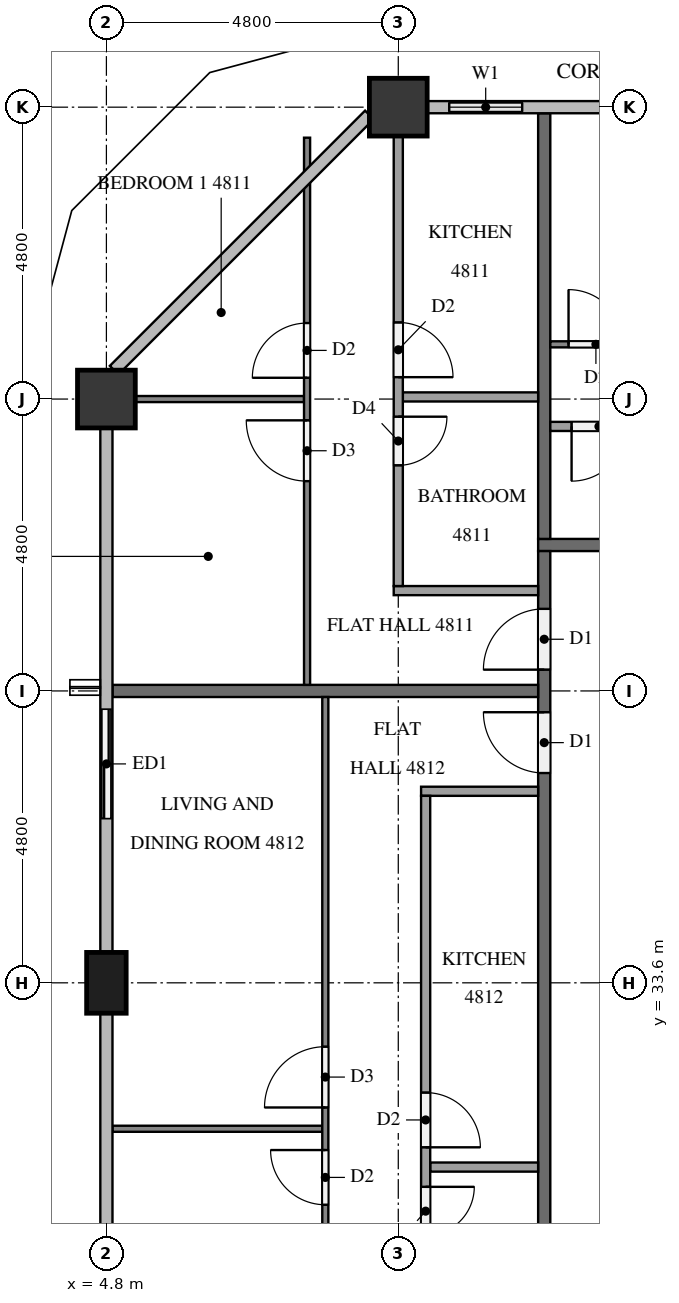
"""IFC4 building model, lengths in metres.
Left out: names, types, materials, properties, quantities, classifications, styles, units other than length and angle.
Written with IfcOpenShell. Run it as: python <this file> out.ifc"""

import sys

from ifc_helpers import new_model, si_unit, direction, frame, frame_2d, origin, origin_2d, place, context, subcontext, project, spatial, rectangle, extrude, element, fill, save


model = new_model("IFC4")
c1 = context("Model", 3, precision=1e-05, world=origin(), true_north=direction((0.0, 1.0)))
c2 = subcontext(c1, "Body", "Model", "MODEL_VIEW")
j1 = project(units=[si_unit("LENGTHUNIT", "METRE"), si_unit("PLANEANGLEUNIT", "RADIAN")], contexts=[c1])
p1 = place(None, origin())
s1 = spatial("IfcSite", under=j1, at=p1, CompositionType="ELEMENT")
p2 = place(p1, origin())
s2 = spatial("IfcBuilding", under=s1, at=p2, CompositionType="ELEMENT")
p3 = place(p2, frame((0.0, 0.0, 185.9)))
s3 = spatial("IfcBuildingStorey", under=s2, at=p3, CompositionType="ELEMENT", Elevation=185.9)
for number, where, z_axis, x_axis in (
    (1, (9.6, 48.0, 0.0), (0.0, 0.0, 1.0), (1.0, 0.0, 0.0)),
    (2, (4.8, 43.2, 0.0), (0.0, 0.0, 1.0), (1.0, 0.0, 0.0)),
):
    element("IfcColumn", number, at=place(p3, frame(where, z_axis=z_axis, x_axis=x_axis)), inside=s3, PredefinedType="COLUMN", context=c2, shape_type="SweptSolid", body=[
        extrude(rectangle(XDim=0.95, YDim=0.95, at=origin_2d()), origin(), (0.0, 0.0, 1.0), 3.2),
    ])
p4 = place(p3, frame((4.8, 33.6, 0.0), z_axis=(0.0, 0.0, 1.0), x_axis=(0.0, 1.0, 0.0)))
e3 = element("IfcColumn", 3, at=p4, inside=s3, PredefinedType="COLUMN", context=c2, shape_type="SweptSolid", body=[
    extrude(rectangle(XDim=1.0, YDim=0.65, at=origin_2d()), origin(), (0.0, 0.0, 1.0), 3.2),
])
p5 = place(p3, frame((12.0, 48.0, 0.0), z_axis=(0.0, 0.0, 1.0), x_axis=(-1.0, 0.0, 0.0)))
e4 = element("IfcWall", 4, at=p5, inside=s3, PredefinedType="SOLIDWALL", context=c2, shape_type="SweptSolid", body=[
    extrude(rectangle(XDim=1.925, YDim=0.15, at=frame_2d((0.962, 0.0))), origin(), (0.0, 0.0, 1.0), 3.2),
])
p6 = place(p5, frame((0.363, 0.0, 0.9)))
e5 = element("IfcOpeningElement", 5, at=p6, cuts=e4, PredefinedType="OPENING", context=c2, shape_type="SweptSolid", body=[
    extrude(rectangle(XDim=1.2, YDim=1.4, at=frame_2d((0.6, 0.7))), frame((0.0, 0.085, 0.0), z_axis=(0.0, -1.0, 0.0), x_axis=(1.0, 0.0, 0.0)), (0.0, 0.0, 1.0), 0.17),
])
p7 = place(p3, frame((4.8, 38.4, 0.0), z_axis=(0.0, 0.0, 1.0), x_axis=(0.0, -1.0, 0.0)))
e6 = element("IfcWall", 6, at=p7, inside=s3, PredefinedType="SOLIDWALL", context=c2, shape_type="SweptSolid", body=[
    extrude(rectangle(XDim=2.4, YDim=0.15, at=frame_2d((1.2, 0.0))), origin(), (0.0, 0.0, 1.0), 3.2),
])
p8 = place(p7, frame((0.3, 0.0, 0.0)))
e7 = element("IfcOpeningElement", 7, at=p8, cuts=e6, PredefinedType="OPENING", context=c2, shape_type="SweptSolid", body=[
    extrude(rectangle(XDim=1.8, YDim=2.4, at=frame_2d((0.9, 1.2))), frame((0.0, 0.085, 0.0), z_axis=(0.0, -1.0, 0.0), x_axis=(1.0, 0.0, 0.0)), (0.0, 0.0, 1.0), 0.17),
])
p9 = place(p3, frame((11.9, 40.8, 0.0), z_axis=(0.0, 0.0, 1.0), x_axis=(1.0, 0.0, 0.0)))
e8 = element("IfcWall", 8, at=p9, inside=s3, PredefinedType="PARTITIONING", context=c2, shape_type="SweptSolid", body=[
    extrude(rectangle(XDim=38.6, YDim=0.2, at=frame_2d((19.3, 0.0))), origin(), (0.0, 0.0, 1.0), 3.2),
])
p10 = place(p9, frame((37.15, 0.0, 0.0)))
e9 = element("IfcOpeningElement", 9, at=p10, cuts=e8, PredefinedType="OPENING", context=c2, shape_type="SweptSolid", body=[
    extrude(rectangle(XDim=1.0, YDim=2.1, at=frame_2d((0.5, 1.05))), frame((0.0, 0.11, 0.0), z_axis=(0.0, -1.0, 0.0), x_axis=(1.0, 0.0, 0.0)), (0.0, 0.0, 1.0), 0.22),
])
p11 = place(p9, frame((20.35, 0.0, 0.0)))
e10 = element("IfcOpeningElement", 10, at=p11, cuts=e8, PredefinedType="OPENING", context=c2, shape_type="SweptSolid", body=[
    extrude(rectangle(XDim=1.0, YDim=2.1, at=frame_2d((0.5, 1.05))), frame((0.0, 0.11, 0.0), z_axis=(0.0, -1.0, 0.0), x_axis=(1.0, 0.0, 0.0)), (0.0, 0.0, 1.0), 0.22),
])
p12 = place(p9, frame((13.15, 0.0, 0.0)))
e11 = element("IfcOpeningElement", 11, at=p12, cuts=e8, PredefinedType="OPENING", context=c2, shape_type="SweptSolid", body=[
    extrude(rectangle(XDim=1.0, YDim=2.1, at=frame_2d((0.5, 1.05))), frame((0.0, 0.11, 0.0), z_axis=(0.0, -1.0, 0.0), x_axis=(1.0, 0.0, 0.0)), (0.0, 0.0, 1.0), 0.22),
])
p13 = place(p3, frame((12.0, 12.1, 0.0), z_axis=(0.0, 0.0, 1.0), x_axis=(0.0, 1.0, 0.0)))
e12 = element("IfcWall", 12, at=p13, inside=s3, PredefinedType="PARTITIONING", context=c2, shape_type="SweptSolid", body=[
    extrude(rectangle(XDim=28.6, YDim=0.2, at=frame_2d((14.3, 0.0))), origin(), (0.0, 0.0, 1.0), 3.2),
])
p14 = place(p13, frame((26.65, 0.0, 0.0)))
e13 = element("IfcOpeningElement", 13, at=p14, cuts=e12, PredefinedType="OPENING", context=c2, shape_type="SweptSolid", body=[
    extrude(rectangle(XDim=1.0, YDim=2.1, at=frame_2d((0.5, 1.05))), frame((0.0, 0.11, 0.0), z_axis=(0.0, -1.0, 0.0), x_axis=(1.0, 0.0, 0.0)), (0.0, 0.0, 1.0), 0.22),
])
p15 = place(p13, frame((24.95, 0.0, 0.0)))
e14 = element("IfcOpeningElement", 14, at=p15, cuts=e12, PredefinedType="OPENING", context=c2, shape_type="SweptSolid", body=[
    extrude(rectangle(XDim=1.0, YDim=2.1, at=frame_2d((0.5, 1.05))), frame((0.0, 0.11, 0.0), z_axis=(0.0, -1.0, 0.0), x_axis=(1.0, 0.0, 0.0)), (0.0, 0.0, 1.0), 0.22),
])
p16 = place(p13, frame((12.95, 0.0, 0.0)))
e15 = element("IfcOpeningElement", 15, at=p16, cuts=e12, PredefinedType="OPENING", context=c2, shape_type="SweptSolid", body=[
    extrude(rectangle(XDim=1.0, YDim=2.1, at=frame_2d((0.5, 1.05))), frame((0.0, 0.11, 0.0), z_axis=(0.0, -1.0, 0.0), x_axis=(1.0, 0.0, 0.0)), (0.0, 0.0, 1.0), 0.22),
])
for number, where, z_axis, x_axis in (
    (16, (12.0, 47.9, 0.0), (0.0, 0.0, 1.0), (0.0, -1.0, 0.0)),
    (17, (4.9, 38.4, 0.0), (0.0, 0.0, 1.0), (1.0, 0.0, 0.0)),
):
    element("IfcWall", number, at=place(p3, frame(where, z_axis=z_axis, x_axis=x_axis)), inside=s3, PredefinedType="PARTITIONING", context=c2, shape_type="SweptSolid", body=[
        extrude(rectangle(XDim=7.0, YDim=0.2, at=frame_2d((3.5, 0.0))), origin(), (0.0, 0.0, 1.0), 3.2),
    ])
p17 = place(p3, frame((12.1, 44.1, 0.0), z_axis=(0.0, 0.0, 1.0), x_axis=(1.0, 0.0, 0.0)))
e18 = element("IfcWall", 18, at=p17, inside=s3, PredefinedType="PARTITIONING", context=c2, shape_type="SweptSolid", body=[
    extrude(rectangle(XDim=14.2, YDim=0.1, at=frame_2d((7.1, 0.0))), origin(), (0.0, 0.0, 1.0), 3.2),
])
p18 = place(p17, frame((9.85, 0.0, 0.0)))
e19 = element("IfcOpeningElement", 19, at=p18, cuts=e18, PredefinedType="OPENING", context=c2, shape_type="SweptSolid", body=[
    extrude(rectangle(XDim=0.9, YDim=2.1, at=frame_2d((0.45, 1.05))), frame((0.0, 0.06, 0.0), z_axis=(0.0, -1.0, 0.0), x_axis=(1.0, 0.0, 0.0)), (0.0, 0.0, 1.0), 0.12),
])
p19 = place(p17, frame((8.15, 0.0, 0.0)))
e20 = element("IfcOpeningElement", 20, at=p19, cuts=e18, PredefinedType="OPENING", context=c2, shape_type="SweptSolid", body=[
    extrude(rectangle(XDim=1.0, YDim=2.1, at=frame_2d((0.5, 1.05))), frame((0.0, 0.06, 0.0), z_axis=(0.0, -1.0, 0.0), x_axis=(1.0, 0.0, 0.0)), (0.0, 0.0, 1.0), 0.12),
])
p20 = place(p17, frame((0.3, 0.0, 0.0)))
e21 = element("IfcOpeningElement", 21, at=p20, cuts=e18, PredefinedType="OPENING", context=c2, shape_type="SweptSolid", body=[
    extrude(rectangle(XDim=0.9, YDim=2.1, at=frame_2d((0.45, 1.05))), frame((0.0, 0.06, 0.0), z_axis=(0.0, -1.0, 0.0), x_axis=(1.0, 0.0, 0.0)), (0.0, 0.0, 1.0), 0.12),
])
p21 = place(p3, frame((24.675, 42.75, 0.0), z_axis=(0.0, 0.0, 1.0), x_axis=(-1.0, 0.0, 0.0)))
e22 = element("IfcWall", 22, at=p21, inside=s3, PredefinedType="PARTITIONING", context=c2, shape_type="SweptSolid", body=[
    extrude(rectangle(XDim=12.575, YDim=0.15, at=frame_2d((6.288, 0.0))), origin(), (0.0, 0.0, 1.0), 3.2),
])
p22 = place(p21, frame((1.777, 0.0, 0.0)))
e23 = element("IfcOpeningElement", 23, at=p22, cuts=e22, PredefinedType="OPENING", context=c2, shape_type="SweptSolid", body=[
    extrude(rectangle(XDim=0.8, YDim=2.1, at=frame_2d((0.4, 1.05))), frame((0.0, 0.085, 0.0), z_axis=(0.0, -1.0, 0.0), x_axis=(1.0, 0.0, 0.0)), (0.0, 0.0, 1.0), 0.17),
])
p23 = place(p21, frame((3.227, 0.0, 0.0)))
e24 = element("IfcOpeningElement", 24, at=p23, cuts=e22, PredefinedType="OPENING", context=c2, shape_type="SweptSolid", body=[
    extrude(rectangle(XDim=0.9, YDim=2.1, at=frame_2d((0.45, 1.05))), frame((0.0, 0.085, 0.0), z_axis=(0.0, -1.0, 0.0), x_axis=(1.0, 0.0, 0.0)), (0.0, 0.0, 1.0), 0.17),
])
p24 = place(p21, frame((11.325, 0.0, 0.0)))
e25 = element("IfcOpeningElement", 25, at=p24, cuts=e22, PredefinedType="OPENING", context=c2, shape_type="SweptSolid", body=[
    extrude(rectangle(XDim=0.9, YDim=2.1, at=frame_2d((0.45, 1.05))), frame((0.0, 0.085, 0.0), z_axis=(0.0, -1.0, 0.0), x_axis=(1.0, 0.0, 0.0)), (0.0, 0.0, 1.0), 0.17),
])
p25 = place(p3, frame((8.05, 43.2, 0.0), z_axis=(0.0, 0.0, 1.0), x_axis=(-1.0, 0.0, 0.0)))
e26 = element("IfcWall", 26, at=p25, inside=s3, PredefinedType="PARTITIONING", context=c2, shape_type="SweptSolid", body=[
    extrude(rectangle(XDim=2.775, YDim=0.1, at=frame_2d((1.388, 0.0))), origin(), (0.0, 0.0, 1.0), 3.2),
])
p26 = place(p3, frame((8.1, 38.5, 0.0), z_axis=(0.0, 0.0, 1.0), x_axis=(0.0, 1.0, 0.0)))
e27 = element("IfcWall", 27, at=p26, inside=s3, PredefinedType="PARTITIONING", context=c2, shape_type="SweptSolid", body=[
    extrude(rectangle(XDim=8.998, YDim=0.1, at=frame_2d((4.499, 0.0))), origin(), (0.0, 0.0, 1.0), 3.2),
])
p27 = place(p26, frame((3.35, 0.0, 0.0)))
e28 = element("IfcOpeningElement", 28, at=p27, cuts=e27, PredefinedType="OPENING", context=c2, shape_type="SweptSolid", body=[
    extrude(rectangle(XDim=1.0, YDim=2.1, at=frame_2d((0.5, 1.05))), frame((0.0, 0.06, 0.0), z_axis=(0.0, -1.0, 0.0), x_axis=(1.0, 0.0, 0.0)), (0.0, 0.0, 1.0), 0.12),
])
p28 = place(p26, frame((5.05, 0.0, 0.0)))
e29 = element("IfcOpeningElement", 29, at=p28, cuts=e27, PredefinedType="OPENING", context=c2, shape_type="SweptSolid", body=[
    extrude(rectangle(XDim=0.9, YDim=2.1, at=frame_2d((0.45, 1.05))), frame((0.0, 0.06, 0.0), z_axis=(0.0, -1.0, 0.0), x_axis=(1.0, 0.0, 0.0)), (0.0, 0.0, 1.0), 0.12),
])
p29 = place(p3, frame((11.9, 43.235, 0.0), z_axis=(0.0, 0.0, 1.0), x_axis=(-1.0, 0.0, 0.0)))
e30 = element("IfcWall", 30, at=p29, inside=s3, PredefinedType="PARTITIONING", context=c2, shape_type="SweptSolid", body=[
    extrude(rectangle(XDim=2.225, YDim=0.15, at=frame_2d((1.112, 0.0))), origin(), (0.0, 0.0, 1.0), 3.2),
])
p30 = place(p3, frame((11.9, 40.05, 0.0), z_axis=(0.0, 0.0, 1.0), x_axis=(-1.0, 0.0, 0.0)))
e31 = element("IfcWall", 31, at=p30, inside=s3, PredefinedType="PARTITIONING", context=c2, shape_type="SweptSolid", body=[
    extrude(rectangle(XDim=2.375, YDim=0.15, at=frame_2d((1.188, 0.0))), origin(), (0.0, 0.0, 1.0), 3.2),
])
p31 = place(p3, frame((9.6, 47.525, 0.0), z_axis=(0.0, 0.0, 1.0), x_axis=(0.0, -1.0, 0.0)))
e32 = element("IfcWall", 32, at=p31, inside=s3, PredefinedType="PARTITIONING", context=c2, shape_type="SweptSolid", body=[
    extrude(rectangle(XDim=7.4, YDim=0.15, at=frame_2d((3.7, 0.0))), origin(), (0.0, 0.0, 1.0), 3.2),
])
p32 = place(p31, frame((4.615, 0.0, 0.0)))
e33 = element("IfcOpeningElement", 33, at=p32, cuts=e32, PredefinedType="OPENING", context=c2, shape_type="SweptSolid", body=[
    extrude(rectangle(XDim=0.8, YDim=2.1, at=frame_2d((0.4, 1.05))), frame((0.0, 0.085, 0.0), z_axis=(0.0, -1.0, 0.0), x_axis=(1.0, 0.0, 0.0)), (0.0, 0.0, 1.0), 0.17),
])
p33 = place(p31, frame((3.065, 0.0, 0.0)))
e34 = element("IfcOpeningElement", 34, at=p33, cuts=e32, PredefinedType="OPENING", context=c2, shape_type="SweptSolid", body=[
    extrude(rectangle(XDim=0.9, YDim=2.1, at=frame_2d((0.45, 1.05))), frame((0.0, 0.085, 0.0), z_axis=(0.0, -1.0, 0.0), x_axis=(1.0, 0.0, 0.0)), (0.0, 0.0, 1.0), 0.17),
])
p34 = place(p3, frame((8.35, 31.2, 0.0), z_axis=(0.0, 0.0, 1.0), x_axis=(-1.0, 0.0, 0.0)))
e35 = element("IfcWall", 35, at=p34, inside=s3, PredefinedType="PARTITIONING", context=c2, shape_type="SweptSolid", body=[
    extrude(rectangle(XDim=3.45, YDim=0.1, at=frame_2d((1.725, 0.0))), origin(), (0.0, 0.0, 1.0), 3.2),
])
p35 = place(p3, frame((8.4, 26.5, 0.0), z_axis=(0.0, 0.0, 1.0), x_axis=(0.0, 1.0, 0.0)))
e36 = element("IfcWall", 36, at=p35, inside=s3, PredefinedType="PARTITIONING", context=c2, shape_type="SweptSolid", body=[
    extrude(rectangle(XDim=11.8, YDim=0.1, at=frame_2d((5.9, 0.0))), origin(), (0.0, 0.0, 1.0), 3.2),
])
p36 = place(p35, frame((5.05, 0.0, 0.0)))
e37 = element("IfcOpeningElement", 37, at=p36, cuts=e36, PredefinedType="OPENING", context=c2, shape_type="SweptSolid", body=[
    extrude(rectangle(XDim=1.0, YDim=2.1, at=frame_2d((0.5, 1.05))), frame((0.0, 0.06, 0.0), z_axis=(0.0, -1.0, 0.0), x_axis=(1.0, 0.0, 0.0)), (0.0, 0.0, 1.0), 0.12),
])
p37 = place(p35, frame((3.45, 0.0, 0.0)))
e38 = element("IfcOpeningElement", 38, at=p37, cuts=e36, PredefinedType="OPENING", context=c2, shape_type="SweptSolid", body=[
    extrude(rectangle(XDim=0.9, YDim=2.1, at=frame_2d((0.45, 1.05))), frame((0.0, 0.06, 0.0), z_axis=(0.0, -1.0, 0.0), x_axis=(1.0, 0.0, 0.0)), (0.0, 0.0, 1.0), 0.12),
])
p38 = place(p3, frame((11.9, 30.57, 0.0), z_axis=(0.0, 0.0, 1.0), x_axis=(-1.0, 0.0, 0.0)))
e39 = element("IfcWall", 39, at=p38, inside=s3, PredefinedType="PARTITIONING", context=c2, shape_type="SweptSolid", body=[
    extrude(rectangle(XDim=1.775, YDim=0.15, at=frame_2d((0.887, 0.0))), origin(), (0.0, 0.0, 1.0), 3.2),
])
p39 = place(p3, frame((11.9, 36.75, 0.0), z_axis=(0.0, 0.0, 1.0), x_axis=(-1.0, 0.0, 0.0)))
e40 = element("IfcWall", 40, at=p39, inside=s3, PredefinedType="PARTITIONING", context=c2, shape_type="SweptSolid", body=[
    extrude(rectangle(XDim=1.925, YDim=0.15, at=frame_2d((0.962, 0.0))), origin(), (0.0, 0.0, 1.0), 3.2),
])
p40 = place(p3, frame((10.05, 36.675, 0.0), z_axis=(0.0, 0.0, 1.0), x_axis=(0.0, -1.0, 0.0)))
e41 = element("IfcWall", 41, at=p40, inside=s3, PredefinedType="PARTITIONING", context=c2, shape_type="SweptSolid", body=[
    extrude(rectangle(XDim=10.175, YDim=0.15, at=frame_2d((5.087, 0.0))), origin(), (0.0, 0.0, 1.0), 3.2),
])
p41 = place(p40, frame((4.88, 0.0, 0.0)))
e42 = element("IfcOpeningElement", 42, at=p41, cuts=e41, PredefinedType="OPENING", context=c2, shape_type="SweptSolid", body=[
    extrude(rectangle(XDim=0.9, YDim=2.1, at=frame_2d((0.45, 1.05))), frame((0.0, 0.085, 0.0), z_axis=(0.0, -1.0, 0.0), x_axis=(1.0, 0.0, 0.0)), (0.0, 0.0, 1.0), 0.17),
])
p42 = place(p40, frame((6.43, 0.0, 0.0)))
e43 = element("IfcOpeningElement", 43, at=p42, cuts=e41, PredefinedType="OPENING", context=c2, shape_type="SweptSolid", body=[
    extrude(rectangle(XDim=0.8, YDim=2.1, at=frame_2d((0.4, 1.05))), frame((0.0, 0.085, 0.0), z_axis=(0.0, -1.0, 0.0), x_axis=(1.0, 0.0, 0.0)), (0.0, 0.0, 1.0), 0.17),
])
p43 = place(p6, origin())
e44 = element("IfcWindow", 44, at=p43, inside=s3, PartitioningType="SINGLE_PANEL", PredefinedType="WINDOW", context=c2, shape_type="SweptSolid", body=[
    extrude(rectangle(XDim=1.2, YDim=1.4, at=frame_2d((0.6, 0.7))), frame((0.0, 0.03, 0.0), z_axis=(0.0, -1.0, 0.0), x_axis=(1.0, 0.0, 0.0)), (0.0, 0.0, 1.0), 0.06),
])
fill(e5, e44)
p44 = place(p8, origin())
e45 = element("IfcDoor", 45, at=p44, inside=s3, OperationType="SLIDING_TO_RIGHT", PredefinedType="DOOR", context=c2, shape_type="SweptSolid", body=[
    extrude(rectangle(XDim=1.8, YDim=2.4, at=frame_2d((0.9, 1.2))), frame((0.0, 0.025, 0.0), z_axis=(0.0, -1.0, 0.0), x_axis=(1.0, 0.0, 0.0)), (0.0, 0.0, 1.0), 0.05),
])
fill(e7, e45)
p45 = place(p14, origin())
e46 = element("IfcDoor", 46, at=p45, inside=s3, OperationType="SINGLE_SWING_LEFT", PredefinedType="DOOR", context=c2, shape_type="SweptSolid", body=[
    extrude(rectangle(XDim=1.0, YDim=2.1, at=frame_2d((0.5, 1.05))), frame((0.0, 0.025, 0.0), z_axis=(0.0, -1.0, 0.0), x_axis=(1.0, 0.0, 0.0)), (0.0, 0.0, 1.0), 0.05),
])
fill(e13, e46)
p46 = place(p15, origin())
e47 = element("IfcDoor", 47, at=p46, inside=s3, OperationType="SINGLE_SWING_RIGHT", PredefinedType="DOOR", context=c2, shape_type="SweptSolid", body=[
    extrude(rectangle(XDim=1.0, YDim=2.1, at=frame_2d((0.5, 1.05))), frame((0.0, 0.025, 0.0), z_axis=(0.0, -1.0, 0.0), x_axis=(1.0, 0.0, 0.0)), (0.0, 0.0, 1.0), 0.05),
])
fill(e14, e47)
p47 = place(p20, origin())
e48 = element("IfcDoor", 48, at=p47, inside=s3, OperationType="SINGLE_SWING_LEFT", PredefinedType="DOOR", context=c2, shape_type="SweptSolid", body=[
    extrude(rectangle(XDim=0.9, YDim=2.1, at=frame_2d((0.45, 1.05))), frame((0.0, 0.025, 0.0), z_axis=(0.0, -1.0, 0.0), x_axis=(1.0, 0.0, 0.0)), (0.0, 0.0, 1.0), 0.05),
])
fill(e21, e48)
p48 = place(p24, origin())
e49 = element("IfcDoor", 49, at=p48, inside=s3, OperationType="SINGLE_SWING_RIGHT", PredefinedType="DOOR", context=c2, shape_type="SweptSolid", body=[
    extrude(rectangle(XDim=0.9, YDim=2.1, at=frame_2d((0.45, 1.05))), frame((0.0, 0.025, 0.0), z_axis=(0.0, -1.0, 0.0), x_axis=(1.0, 0.0, 0.0)), (0.0, 0.0, 1.0), 0.05),
])
fill(e25, e49)
p49 = place(p27, origin())
e50 = element("IfcDoor", 50, at=p49, inside=s3, OperationType="SINGLE_SWING_RIGHT", PredefinedType="DOOR", context=c2, shape_type="SweptSolid", body=[
    extrude(rectangle(XDim=1.0, YDim=2.1, at=frame_2d((0.5, 1.05))), frame((0.0, 0.025, 0.0), z_axis=(0.0, -1.0, 0.0), x_axis=(1.0, 0.0, 0.0)), (0.0, 0.0, 1.0), 0.05),
])
fill(e28, e50)
p50 = place(p28, origin())
e51 = element("IfcDoor", 51, at=p50, inside=s3, OperationType="SINGLE_SWING_LEFT", PredefinedType="DOOR", context=c2, shape_type="SweptSolid", body=[
    extrude(rectangle(XDim=0.9, YDim=2.1, at=frame_2d((0.45, 1.05))), frame((0.0, 0.025, 0.0), z_axis=(0.0, -1.0, 0.0), x_axis=(1.0, 0.0, 0.0)), (0.0, 0.0, 1.0), 0.05),
])
fill(e29, e51)
p51 = place(p32, origin())
e52 = element("IfcDoor", 52, at=p51, inside=s3, OperationType="SINGLE_SWING_LEFT", PredefinedType="DOOR", context=c2, shape_type="SweptSolid", body=[
    extrude(rectangle(XDim=0.8, YDim=2.1, at=frame_2d((0.4, 1.05))), frame((0.0, 0.025, 0.0), z_axis=(0.0, -1.0, 0.0), x_axis=(1.0, 0.0, 0.0)), (0.0, 0.0, 1.0), 0.05),
])
fill(e33, e52)
p52 = place(p33, origin())
e53 = element("IfcDoor", 53, at=p52, inside=s3, OperationType="SINGLE_SWING_RIGHT", PredefinedType="DOOR", context=c2, shape_type="SweptSolid", body=[
    extrude(rectangle(XDim=0.9, YDim=2.1, at=frame_2d((0.45, 1.05))), frame((0.0, 0.025, 0.0), z_axis=(0.0, -1.0, 0.0), x_axis=(1.0, 0.0, 0.0)), (0.0, 0.0, 1.0), 0.05),
])
fill(e34, e53)
p53 = place(p36, origin())
e54 = element("IfcDoor", 54, at=p53, inside=s3, OperationType="SINGLE_SWING_LEFT", PredefinedType="DOOR", context=c2, shape_type="SweptSolid", body=[
    extrude(rectangle(XDim=1.0, YDim=2.1, at=frame_2d((0.5, 1.05))), frame((0.0, 0.025, 0.0), z_axis=(0.0, -1.0, 0.0), x_axis=(1.0, 0.0, 0.0)), (0.0, 0.0, 1.0), 0.05),
])
fill(e37, e54)
p54 = place(p37, origin())
e55 = element("IfcDoor", 55, at=p54, inside=s3, OperationType="SINGLE_SWING_RIGHT", PredefinedType="DOOR", context=c2, shape_type="SweptSolid", body=[
    extrude(rectangle(XDim=0.9, YDim=2.1, at=frame_2d((0.45, 1.05))), frame((0.0, 0.025, 0.0), z_axis=(0.0, -1.0, 0.0), x_axis=(1.0, 0.0, 0.0)), (0.0, 0.0, 1.0), 0.05),
])
fill(e38, e55)
p55 = place(p41, origin())
e56 = element("IfcDoor", 56, at=p55, inside=s3, OperationType="SINGLE_SWING_RIGHT", PredefinedType="DOOR", context=c2, shape_type="SweptSolid", body=[
    extrude(rectangle(XDim=0.9, YDim=2.1, at=frame_2d((0.45, 1.05))), frame((0.0, 0.025, 0.0), z_axis=(0.0, -1.0, 0.0), x_axis=(1.0, 0.0, 0.0)), (0.0, 0.0, 1.0), 0.05),
])
fill(e42, e56)
p56 = place(p42, origin())
e57 = element("IfcDoor", 57, at=p56, inside=s3, OperationType="SINGLE_SWING_LEFT", PredefinedType="DOOR", context=c2, shape_type="SweptSolid", body=[
    extrude(rectangle(XDim=0.8, YDim=2.1, at=frame_2d((0.4, 1.05))), frame((0.0, 0.025, 0.0), z_axis=(0.0, -1.0, 0.0), x_axis=(1.0, 0.0, 0.0)), (0.0, 0.0, 1.0), 0.05),
])
fill(e43, e57)
save(model, sys.argv[1])
